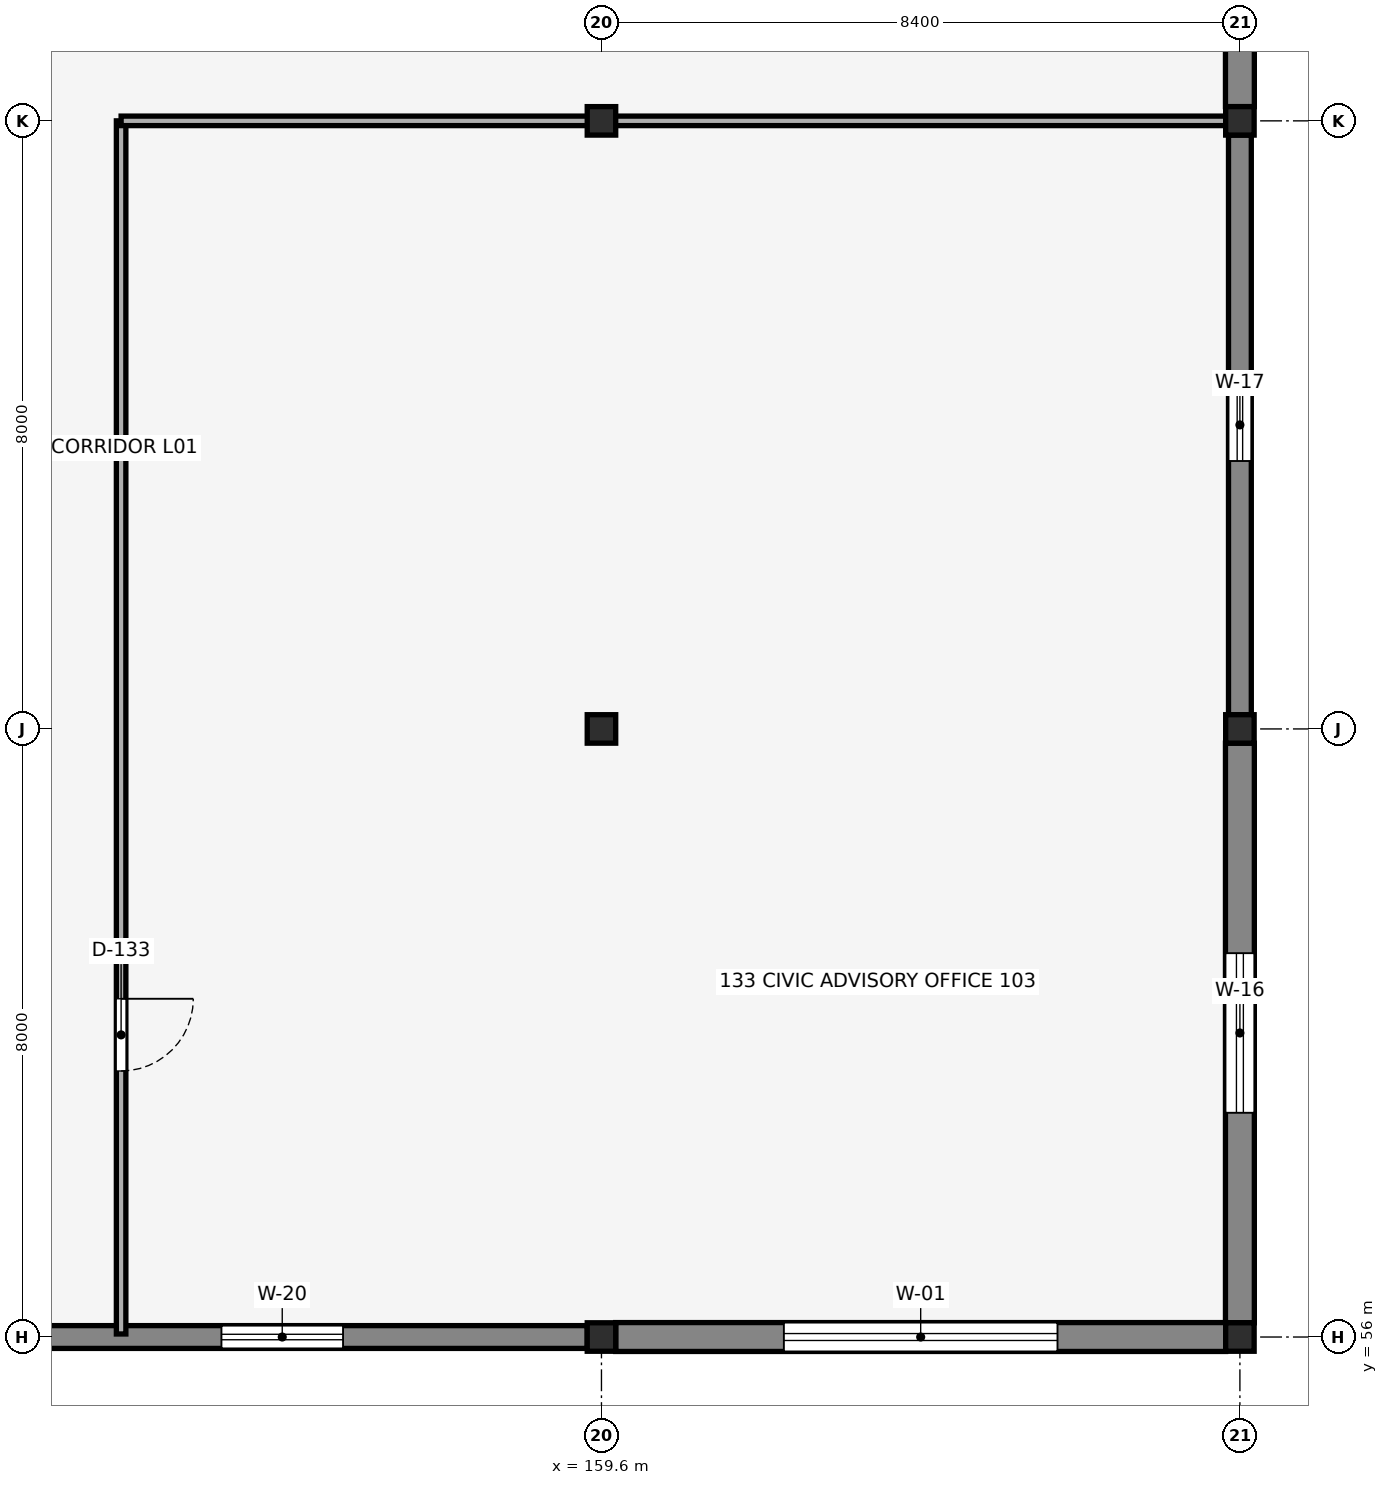
"""IFC4 building model, lengths in metres.
Left out: names, types, materials, properties, quantities, classifications, styles, units other than length and angle.
Written with IfcOpenShell. Run it as: python <this file> out.ifc"""

import sys

from ifc_helpers import new_model, si_unit, direction, frame, frame_2d, origin, origin_2d, place, context, subcontext, project, spatial, rectangle, i_section, extrude, element, fill, save


model = new_model("IFC4")
c1 = context("Model", 3, precision=1e-05, world=origin(), true_north=direction((0.0, 1.0)))
c2 = subcontext(c1, "Body", "Model", "MODEL_VIEW")
j1 = project(units=[si_unit("LENGTHUNIT", "METRE"), si_unit("PLANEANGLEUNIT", "RADIAN")], contexts=[c1])
p1 = place(None, origin())
s1 = spatial("IfcSite", under=j1, at=p1, CompositionType="ELEMENT")
p2 = place(p1, origin())
s2 = spatial("IfcBuilding", under=s1, at=p2, CompositionType="ELEMENT")
p3 = place(p2, frame((0.0, 0.0, 5.44)))
s3 = spatial("IfcBuildingStorey", under=s2, at=p3, CompositionType="ELEMENT", Elevation=5.44)
for number, where, z_axis, x_axis in (
    (1, (159.6, 56.0, 0.0), (0.0, 0.0, 1.0), (1.0, 0.0, 0.0)),
    (2, (159.6, 64.0, 0.0), (0.0, 0.0, 1.0), (1.0, 0.0, 0.0)),
    (3, (159.6, 72.0, 0.0), (0.0, 0.0, 1.0), (1.0, 0.0, 0.0)),
    (4, (168.0, 56.0, 0.0), (0.0, 0.0, 1.0), (1.0, 0.0, 0.0)),
    (5, (168.0, 64.0, 0.0), (0.0, 0.0, 1.0), (1.0, 0.0, 0.0)),
    (6, (168.0, 72.0, 0.0), (0.0, 0.0, 1.0), (1.0, 0.0, 0.0)),
):
    element("IfcColumn", number, at=place(p3, frame(where, z_axis=z_axis, x_axis=x_axis)), inside=s3, PredefinedType="COLUMN", context=c2, shape_type="SweptSolid", body=[
        extrude(i_section(OverallWidth=0.375, OverallDepth=0.375, WebThickness=0.017, FlangeThickness=0.027, FilletRadius=0.015, at=origin_2d()), origin(), (0.0, 0.0, 1.0), 3.8),
    ])
p4 = place(p3, frame((168.0, 56.187, 0.0), z_axis=(0.0, 0.0, 1.0), x_axis=(0.0, 1.0, 0.0)))
e7 = element("IfcWall", 7, at=p4, inside=s3, PredefinedType="SOLIDWALL", context=c2, shape_type="SweptSolid", body=[
    extrude(rectangle(XDim=7.625, YDim=0.38, at=frame_2d((3.813, 0.0))), origin(), (0.0, 0.0, 1.0), 3.442),
])
p5 = place(p4, frame((2.763, 0.0, 1.55), z_axis=(0.0, 0.0, 1.0), x_axis=(1.0, 0.0, 0.0)))
e8 = element("IfcOpeningElement", 8, at=p5, cuts=e7, PredefinedType="OPENING", context=c2, shape_type="SweptSolid", body=[
    extrude(rectangle(XDim=2.1, YDim=0.8, at=frame_2d((1.05, 0.4))), frame((0.0, 0.2, 0.0), z_axis=(0.0, -1.0, 0.0), x_axis=(1.0, 0.0, 0.0)), (0.0, 0.0, 1.0), 0.4),
])
p6 = place(p3, frame((168.0, 64.187, 0.0), z_axis=(0.0, 0.0, 1.0), x_axis=(0.0, 1.0, 0.0)))
e9 = element("IfcWall", 9, at=p6, inside=s3, PredefinedType="SOLIDWALL", context=c2, shape_type="SweptSolid", body=[
    extrude(rectangle(XDim=7.625, YDim=0.3, at=frame_2d((3.813, 0.0))), origin(), (0.0, 0.0, 1.0), 3.442),
])
p7 = place(p6, frame((3.338, 0.0, 0.65), z_axis=(0.0, 0.0, 1.0), x_axis=(1.0, 0.0, 0.0)))
e10 = element("IfcOpeningElement", 10, at=p7, cuts=e9, PredefinedType="OPENING", context=c2, shape_type="SweptSolid", body=[
    extrude(rectangle(XDim=0.95, YDim=2.1, at=frame_2d((0.475, 1.05))), frame((0.0, 0.16, 0.0), z_axis=(0.0, -1.0, 0.0), x_axis=(1.0, 0.0, 0.0)), (0.0, 0.0, 1.0), 0.32),
])
p8 = place(p3, frame((168.0, 72.187, 0.0), z_axis=(0.0, 0.0, 1.0), x_axis=(0.0, 1.0, 0.0)))
e11 = element("IfcWall", 11, at=p8, inside=s3, PredefinedType="SOLIDWALL", context=c2, shape_type="SweptSolid", body=[
    extrude(rectangle(XDim=7.625, YDim=0.38, at=frame_2d((3.813, 0.0))), origin(), (0.0, 0.0, 1.0), 3.5),
])
p9 = place(p3, frame((151.387, 56.0, 0.0), z_axis=(0.0, 0.0, 1.0), x_axis=(1.0, 0.0, 0.0)))
e12 = element("IfcWall", 12, at=p9, inside=s3, PredefinedType="SOLIDWALL", context=c2, shape_type="SweptSolid", body=[
    extrude(rectangle(XDim=8.025, YDim=0.3, at=frame_2d((4.013, 0.0))), origin(), (0.0, 0.0, 1.0), 3.45),
])
p10 = place(p9, frame((3.213, 0.0, 0.9), z_axis=(0.0, 0.0, 1.0), x_axis=(1.0, 0.0, 0.0)))
e13 = element("IfcOpeningElement", 13, at=p10, cuts=e12, PredefinedType="OPENING", context=c2, shape_type="SweptSolid", body=[
    extrude(rectangle(XDim=1.6, YDim=1.2, at=frame_2d((0.8, 0.6))), frame((0.0, 0.16, 0.0), z_axis=(0.0, -1.0, 0.0), x_axis=(1.0, 0.0, 0.0)), (0.0, 0.0, 1.0), 0.32),
])
p11 = place(p3, frame((159.787, 56.0, 0.0), z_axis=(0.0, 0.0, 1.0), x_axis=(1.0, 0.0, 0.0)))
e14 = element("IfcWall", 14, at=p11, inside=s3, PredefinedType="SOLIDWALL", context=c2, shape_type="SweptSolid", body=[
    extrude(rectangle(XDim=8.025, YDim=0.38, at=frame_2d((4.013, 0.0))), origin(), (0.0, 0.0, 1.0), 3.45),
])
p12 = place(p11, frame((2.213, 0.0, 0.9), z_axis=(0.0, 0.0, 1.0), x_axis=(1.0, 0.0, 0.0)))
e15 = element("IfcOpeningElement", 15, at=p12, cuts=e14, PredefinedType="OPENING", context=c2, shape_type="SweptSolid", body=[
    extrude(rectangle(XDim=3.6, YDim=1.8, at=frame_2d((1.8, 0.9))), frame((0.0, 0.2, 0.0), z_axis=(0.0, -1.0, 0.0), x_axis=(1.0, 0.0, 0.0)), (0.0, 0.0, 1.0), 0.4),
])
p13 = place(p3, frame((153.28, 56.04, 0.0), z_axis=(0.0, 0.0, 1.0), x_axis=(0.0, 1.0, 0.0)))
e16 = element("IfcWall", 16, at=p13, inside=s3, PredefinedType="PARTITIONING", context=c2, shape_type="SweptSolid", body=[
    extrude(rectangle(XDim=15.96, YDim=0.125, at=frame_2d((7.98, 0.0))), origin(), (0.0, 0.0, 1.0), 3.8),
])
p14 = place(p13, frame((4.41, 0.0, 0.0), z_axis=(0.0, 0.0, 1.0), x_axis=(-1.0, 0.0, 0.0)))
e17 = element("IfcOpeningElement", 17, at=p14, cuts=e16, PredefinedType="OPENING", context=c2, shape_type="SweptSolid", body=[
    extrude(rectangle(XDim=0.95, YDim=2.15, at=frame_2d((0.475, 1.075))), frame((0.0, 0.073, 0.0), z_axis=(0.0, -1.0, 0.0), x_axis=(1.0, 0.0, 0.0)), (0.0, 0.0, 1.0), 0.145),
])
p15 = place(p3, frame((153.28, 72.0, 0.0), z_axis=(0.0, 0.0, 1.0), x_axis=(1.0, 0.0, 0.0)))
e18 = element("IfcWall", 18, at=p15, inside=s3, PredefinedType="PARTITIONING", context=c2, shape_type="SweptSolid", body=[
    extrude(rectangle(XDim=6.143, YDim=0.125, at=frame_2d((3.071, 0.0))), origin(), (0.0, 0.0, 1.0), 3.26),
])
p16 = place(p3, frame((159.777, 72.0, 0.0), z_axis=(0.0, 0.0, 1.0), x_axis=(1.0, 0.0, 0.0)))
e19 = element("IfcWall", 19, at=p16, inside=s3, PredefinedType="PARTITIONING", context=c2, shape_type="SweptSolid", body=[
    extrude(rectangle(XDim=8.045, YDim=0.125, at=frame_2d((4.023, 0.0))), origin(), (0.0, 0.0, 1.0), 3.26),
])
p17 = place(p5, origin())
e20 = element("IfcWindow", 20, at=p17, inside=s3, PartitioningType="DOUBLE_PANEL_HORIZONTAL", PredefinedType="WINDOW", context=c2, shape_type="SweptSolid", body=[
    extrude(rectangle(XDim=2.1, YDim=0.8, at=frame_2d((1.05, 0.4))), frame((0.0, 0.03, 0.0), z_axis=(0.0, -1.0, 0.0), x_axis=(1.0, 0.0, 0.0)), (0.0, 0.0, 1.0), 0.06),
])
fill(e8, e20)
p18 = place(p7, origin())
e21 = element("IfcWindow", 21, at=p18, inside=s3, PartitioningType="SINGLE_PANEL", PredefinedType="WINDOW", context=c2, shape_type="SweptSolid", body=[
    extrude(rectangle(XDim=0.95, YDim=2.1, at=frame_2d((0.475, 1.05))), frame((0.0, 0.03, 0.0), z_axis=(0.0, -1.0, 0.0), x_axis=(1.0, 0.0, 0.0)), (0.0, 0.0, 1.0), 0.06),
])
fill(e10, e21)
p19 = place(p10, origin())
e22 = element("IfcWindow", 22, at=p19, inside=s3, PartitioningType="DOUBLE_PANEL_VERTICAL", PredefinedType="WINDOW", context=c2, shape_type="SweptSolid", body=[
    extrude(rectangle(XDim=1.6, YDim=1.2, at=frame_2d((0.8, 0.6))), frame((0.0, 0.03, 0.0), z_axis=(0.0, -1.0, 0.0), x_axis=(1.0, 0.0, 0.0)), (0.0, 0.0, 1.0), 0.06),
])
fill(e13, e22)
p20 = place(p12, origin())
e23 = element("IfcWindow", 23, at=p20, inside=s3, PartitioningType="TRIPLE_PANEL_VERTICAL", PredefinedType="WINDOW", context=c2, shape_type="SweptSolid", body=[
    extrude(rectangle(XDim=3.6, YDim=1.8, at=frame_2d((1.8, 0.9))), frame((0.0, 0.03, 0.0), z_axis=(0.0, -1.0, 0.0), x_axis=(1.0, 0.0, 0.0)), (0.0, 0.0, 1.0), 0.06),
])
fill(e15, e23)
p21 = place(p14, origin())
e24 = element("IfcDoor", 24, at=p21, inside=s3, OperationType="SINGLE_SWING_LEFT", PredefinedType="DOOR", context=c2, shape_type="SweptSolid", body=[
    extrude(rectangle(XDim=0.95, YDim=2.15, at=frame_2d((0.475, 1.075))), frame((0.0, 0.025, 0.0), z_axis=(0.0, -1.0, 0.0), x_axis=(1.0, 0.0, 0.0)), (0.0, 0.0, 1.0), 0.05),
])
fill(e17, e24)
save(model, sys.argv[1])
